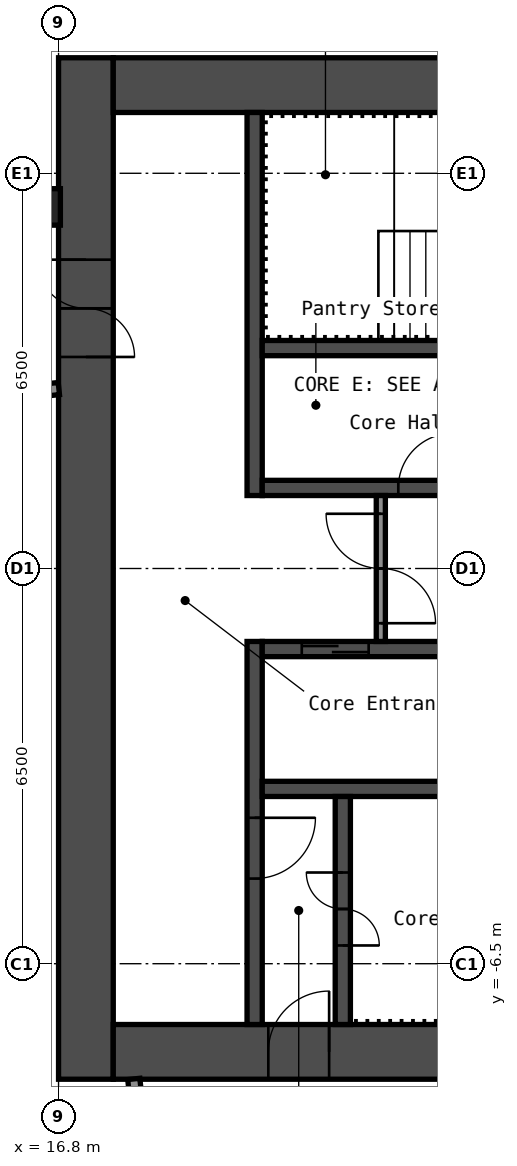
"""IFC4 building model, lengths in metres.
Left out: names, types, materials, properties, quantities, classifications, styles, units other than length and angle.
Written with IfcOpenShell. Run it as: python <this file> out.ifc"""

import sys

from ifc_helpers import new_model, si_unit, direction, frame, frame_2d, origin, origin_2d, place, context, subcontext, project, spatial, rectangle, hollow_rectangle, extrude, element, fill, save


model = new_model("IFC4")
c1 = context("Model", 3, precision=1e-05, world=origin(), true_north=direction((0.0, 1.0)))
c2 = subcontext(c1, "Body", "Model", "MODEL_VIEW")
j1 = project(units=[si_unit("LENGTHUNIT", "METRE"), si_unit("PLANEANGLEUNIT", "RADIAN")], contexts=[c1])
p1 = place(None, origin())
s1 = spatial("IfcSite", under=j1, at=p1, CompositionType="ELEMENT")
p2 = place(p1, origin())
s2 = spatial("IfcBuilding", under=s1, at=p2, CompositionType="ELEMENT")
p3 = place(p2, frame((0.0, 0.0, 258.2)))
s3 = spatial("IfcBuildingStorey", under=s2, at=p3, CompositionType="ELEMENT", Elevation=258.2)
p4 = place(p3, frame((16.53, 5.947, 0.0), z_axis=(0.0, 0.0, 1.0), x_axis=(1.0, 0.0, 0.0)))
e1 = element("IfcColumn", 1, at=p4, inside=s3, PredefinedType="COLUMN", context=c2, shape_type="SweptSolid", body=[
    extrude(hollow_rectangle(XDim=0.6, YDim=0.6, WallThickness=0.025, InnerFilletRadius=0.038, OuterFilletRadius=0.062, at=origin_2d()), origin(), (0.0, 0.0, 1.0), 2.75),
])
p5 = place(p3, frame((17.25, -8.4, 0.0), z_axis=(0.0, 0.0, 1.0), x_axis=(0.0, 1.0, 0.0)))
e2 = element("IfcWall", 2, at=p5, inside=s3, PredefinedType="SHEAR", context=c2, shape_type="SweptSolid", body=[
    extrude(rectangle(XDim=16.8, YDim=0.9, at=frame_2d((8.4, 0.0))), origin(), (0.0, 0.0, 1.0), 2.75),
])
p6 = place(p5, frame((11.879, 0.0, 0.0)))
e3 = element("IfcOpeningElement", 3, at=p6, cuts=e2, PredefinedType="OPENING", context=c2, shape_type="SweptSolid", body=[
    extrude(rectangle(XDim=1.6, YDim=2.1, at=frame_2d((0.8, 1.05))), frame((0.0, 0.46, 0.0), z_axis=(0.0, -1.0, 0.0), x_axis=(1.0, 0.0, 0.0)), (0.0, 0.0, 1.0), 0.92),
])
p7 = place(p3, frame((17.7, 7.95, 0.0), z_axis=(0.0, 0.0, 1.0), x_axis=(1.0, 0.0, 0.0)))
e4 = element("IfcWall", 4, at=p7, inside=s3, PredefinedType="SHEAR", context=c2, shape_type="SweptSolid", body=[
    extrude(rectangle(XDim=15.0, YDim=0.9, at=frame_2d((7.5, 0.0))), origin(), (0.0, 0.0, 1.0), 2.75),
])
p8 = place(p7, frame((10.4, 0.0, 0.0)))
e5 = element("IfcOpeningElement", 5, at=p8, cuts=e4, PredefinedType="OPENING", context=c2, shape_type="SweptSolid", body=[
    extrude(rectangle(XDim=1.2, YDim=2.1, at=frame_2d((0.6, 1.05))), frame((0.0, 0.46, 0.0), z_axis=(0.0, -1.0, 0.0), x_axis=(1.0, 0.0, 0.0)), (0.0, 0.0, 1.0), 0.92),
])
p9 = place(p7, frame((13.35, 0.0, 0.0)))
e6 = element("IfcOpeningElement", 6, at=p9, cuts=e4, PredefinedType="OPENING", context=c2, shape_type="SweptSolid", body=[
    extrude(rectangle(XDim=0.9, YDim=2.1, at=frame_2d((0.45, 1.05))), frame((0.0, 0.46, 0.0), z_axis=(0.0, -1.0, 0.0), x_axis=(1.0, 0.0, 0.0)), (0.0, 0.0, 1.0), 0.92),
])
p10 = place(p3, frame((17.7, -7.95, 0.0), z_axis=(0.0, 0.0, 1.0), x_axis=(1.0, 0.0, 0.0)))
e7 = element("IfcWall", 7, at=p10, inside=s3, PredefinedType="SHEAR", context=c2, shape_type="SweptSolid", body=[
    extrude(rectangle(XDim=15.0, YDim=0.9, at=frame_2d((7.5, 0.0))), origin(), (0.0, 0.0, 1.0), 2.75),
])
p11 = place(p10, frame((2.55, 0.0, 0.0)))
e8 = element("IfcOpeningElement", 8, at=p11, cuts=e7, PredefinedType="OPENING", context=c2, shape_type="SweptSolid", body=[
    extrude(rectangle(XDim=1.0, YDim=2.1, at=frame_2d((0.5, 1.05))), frame((0.0, 0.46, 0.0), z_axis=(0.0, -1.0, 0.0), x_axis=(1.0, 0.0, 0.0)), (0.0, 0.0, 1.0), 0.92),
])
p12 = place(p3, frame((20.025, 1.2, 0.0), z_axis=(0.0, 0.0, 1.0), x_axis=(0.0, 1.0, 0.0)))
e9 = element("IfcWall", 9, at=p12, inside=s3, PredefinedType="SHEAR", context=c2, shape_type="SweptSolid", body=[
    extrude(rectangle(XDim=6.3, YDim=0.25, at=frame_2d((3.15, 0.0))), origin(), (0.0, 0.0, 1.0), 2.75),
])
p13 = place(p3, frame((20.025, -7.5, 0.0), z_axis=(0.0, 0.0, 1.0), x_axis=(0.0, 1.0, 0.0)))
e10 = element("IfcWall", 10, at=p13, inside=s3, PredefinedType="SHEAR", context=c2, shape_type="SweptSolid", body=[
    extrude(rectangle(XDim=6.3, YDim=0.25, at=frame_2d((3.15, 0.0))), origin(), (0.0, 0.0, 1.0), 2.75),
])
p14 = place(p13, frame((2.4, 0.0, 0.0)))
e11 = element("IfcOpeningElement", 11, at=p14, cuts=e10, PredefinedType="OPENING", context=c2, shape_type="SweptSolid", body=[
    extrude(rectangle(XDim=1.0, YDim=2.1, at=frame_2d((0.5, 1.05))), frame((0.0, 0.135, 0.0), z_axis=(0.0, -1.0, 0.0), x_axis=(1.0, 0.0, 0.0)), (0.0, 0.0, 1.0), 0.27),
])
p15 = place(p3, frame((20.15, 1.325, 0.0), z_axis=(0.0, 0.0, 1.0), x_axis=(1.0, 0.0, 0.0)))
e12 = element("IfcWall", 12, at=p15, inside=s3, PredefinedType="SHEAR", context=c2, shape_type="SweptSolid", body=[
    extrude(rectangle(XDim=7.5, YDim=0.25, at=frame_2d((3.75, 0.0))), origin(), (0.0, 0.0, 1.0), 2.75),
])
p16 = place(p15, frame((2.238, 0.0, 0.0)))
e13 = element("IfcOpeningElement", 13, at=p16, cuts=e12, PredefinedType="OPENING", context=c2, shape_type="SweptSolid", body=[
    extrude(rectangle(XDim=0.9, YDim=2.1, at=frame_2d((0.45, 1.05))), frame((0.0, 0.135, 0.0), z_axis=(0.0, -1.0, 0.0), x_axis=(1.0, 0.0, 0.0)), (0.0, 0.0, 1.0), 0.27),
])
p17 = place(p15, frame((5.938, 0.0, 0.0)))
e14 = element("IfcOpeningElement", 14, at=p17, cuts=e12, PredefinedType="OPENING", context=c2, shape_type="SweptSolid", body=[
    extrude(rectangle(XDim=0.9, YDim=2.1, at=frame_2d((0.45, 1.05))), frame((0.0, 0.135, 0.0), z_axis=(0.0, -1.0, 0.0), x_axis=(1.0, 0.0, 0.0)), (0.0, 0.0, 1.0), 0.27),
])
p18 = place(p3, frame((20.15, 3.625, 0.0), z_axis=(0.0, 0.0, 1.0), x_axis=(1.0, 0.0, 0.0)))
e15 = element("IfcWall", 15, at=p18, inside=s3, PredefinedType="SHEAR", context=c2, shape_type="SweptSolid", body=[
    extrude(rectangle(XDim=7.5, YDim=0.25, at=frame_2d((3.75, 0.0))), origin(), (0.0, 0.0, 1.0), 2.75),
])
p19 = place(p3, frame((20.15, -1.325, 0.0), z_axis=(0.0, 0.0, 1.0), x_axis=(1.0, 0.0, 0.0)))
e16 = element("IfcWall", 16, at=p19, inside=s3, PredefinedType="SHEAR", context=c2, shape_type="SweptSolid", body=[
    extrude(rectangle(XDim=7.5, YDim=0.25, at=frame_2d((3.75, 0.0))), origin(), (0.0, 0.0, 1.0), 2.75),
])
p20 = place(p19, frame((0.65, 0.0, 0.0)))
e17 = element("IfcOpeningElement", 17, at=p20, cuts=e16, PredefinedType="OPENING", context=c2, shape_type="SweptSolid", body=[
    extrude(rectangle(XDim=1.1, YDim=2.1, at=frame_2d((0.55, 1.05))), frame((0.0, 0.135, 0.0), z_axis=(0.0, -1.0, 0.0), x_axis=(1.0, 0.0, 0.0)), (0.0, 0.0, 1.0), 0.27),
])
p21 = place(p19, frame((3.05, 0.0, 0.0)))
e18 = element("IfcOpeningElement", 18, at=p21, cuts=e16, PredefinedType="OPENING", context=c2, shape_type="SweptSolid", body=[
    extrude(rectangle(XDim=1.1, YDim=2.1, at=frame_2d((0.55, 1.05))), frame((0.0, 0.135, 0.0), z_axis=(0.0, -1.0, 0.0), x_axis=(1.0, 0.0, 0.0)), (0.0, 0.0, 1.0), 0.27),
])
p22 = place(p19, frame((5.45, 0.0, 0.0)))
e19 = element("IfcOpeningElement", 19, at=p22, cuts=e16, PredefinedType="OPENING", context=c2, shape_type="SweptSolid", body=[
    extrude(rectangle(XDim=1.1, YDim=2.1, at=frame_2d((0.55, 1.05))), frame((0.0, 0.135, 0.0), z_axis=(0.0, -1.0, 0.0), x_axis=(1.0, 0.0, 0.0)), (0.0, 0.0, 1.0), 0.27),
])
p23 = place(p3, frame((20.15, -3.625, 0.0), z_axis=(0.0, 0.0, 1.0), x_axis=(1.0, 0.0, 0.0)))
e20 = element("IfcWall", 20, at=p23, inside=s3, PredefinedType="SHEAR", context=c2, shape_type="SweptSolid", body=[
    extrude(rectangle(XDim=7.5, YDim=0.25, at=frame_2d((3.75, 0.0))), origin(), (0.0, 0.0, 1.0), 2.75),
])
p24 = place(p3, frame((21.475, -7.5, 0.0), z_axis=(0.0, 0.0, 1.0), x_axis=(0.0, 1.0, 0.0)))
e21 = element("IfcWall", 21, at=p24, inside=s3, PredefinedType="SHEAR", context=c2, shape_type="SweptSolid", body=[
    extrude(rectangle(XDim=3.75, YDim=0.25, at=frame_2d((1.875, 0.0))), origin(), (0.0, 0.0, 1.0), 2.75),
])
p25 = place(p24, frame((1.3, 0.0, 0.0)))
e22 = element("IfcOpeningElement", 22, at=p25, cuts=e21, PredefinedType="OPENING", context=c2, shape_type="SweptSolid", body=[
    extrude(rectangle(XDim=1.2, YDim=2.1, at=frame_2d((0.6, 1.05))), frame((0.0, 0.135, 0.0), z_axis=(0.0, -1.0, 0.0), x_axis=(1.0, 0.0, 0.0)), (0.0, 0.0, 1.0), 0.27),
])
p26 = place(p3, frame((22.1, -1.2, 0.0), z_axis=(0.0, 0.0, 1.0), x_axis=(0.0, 1.0, 0.0)))
e23 = element("IfcWall", 23, at=p26, inside=s3, PredefinedType="PARTITIONING", context=c2, shape_type="SweptSolid", body=[
    extrude(rectangle(XDim=2.4, YDim=0.15, at=frame_2d((1.2, 0.0))), origin(), (0.0, 0.0, 1.0), 2.75),
])
p27 = place(p26, frame((0.3, 0.0, 0.0)))
e24 = element("IfcOpeningElement", 24, at=p27, cuts=e23, PredefinedType="OPENING", context=c2, shape_type="SweptSolid", body=[
    extrude(rectangle(XDim=1.8, YDim=2.1, at=frame_2d((0.9, 1.05))), frame((0.0, 0.085, 0.0), z_axis=(0.0, -1.0, 0.0), x_axis=(1.0, 0.0, 0.0)), (0.0, 0.0, 1.0), 0.17),
])
p28 = place(p3, frame((-16.572, -0.549, 0.0), z_axis=(0.0, 0.0, 1.0), x_axis=(0.994521146831, 0.104535584879, 0.0)))
e25 = element("IfcWall", 25, at=p28, inside=s3, PredefinedType="PARTITIONING", context=c2, shape_type="SweptSolid", body=[
    extrude(rectangle(XDim=33.561, YDim=0.2, at=frame_2d((16.78, 0.0))), origin(), (0.0, 0.0, 1.0), 2.75),
])
p29 = place(p28, frame((1.82, 0.0, 0.0)))
e26 = element("IfcOpeningElement", 26, at=p29, cuts=e25, PredefinedType="OPENING", context=c2, shape_type="SweptSolid", body=[
    extrude(rectangle(XDim=0.9, YDim=2.1, at=frame_2d((0.45, 1.05))), frame((0.0, 0.11, 0.0), z_axis=(0.0, -1.0, 0.0), x_axis=(1.0, 0.0, 0.0)), (0.0, 0.0, 1.0), 0.22),
])
p30 = place(p28, frame((6.02, 0.0, 0.0)))
e27 = element("IfcOpeningElement", 27, at=p30, cuts=e25, PredefinedType="OPENING", context=c2, shape_type="SweptSolid", body=[
    extrude(rectangle(XDim=0.9, YDim=2.1, at=frame_2d((0.45, 1.05))), frame((0.0, 0.11, 0.0), z_axis=(0.0, -1.0, 0.0), x_axis=(1.0, 0.0, 0.0)), (0.0, 0.0, 1.0), 0.22),
])
p31 = place(p28, frame((11.25, 0.0, 0.0)))
e28 = element("IfcOpeningElement", 28, at=p31, cuts=e25, PredefinedType="OPENING", context=c2, shape_type="SweptSolid", body=[
    extrude(rectangle(XDim=1.0, YDim=2.1, at=frame_2d((0.5, 1.05))), frame((0.0, 0.11, 0.0), z_axis=(0.0, -1.0, 0.0), x_axis=(1.0, 0.0, 0.0)), (0.0, 0.0, 1.0), 0.22),
])
p32 = place(p28, frame((12.95, 0.0, 0.0)))
e29 = element("IfcOpeningElement", 29, at=p32, cuts=e25, PredefinedType="OPENING", context=c2, shape_type="SweptSolid", body=[
    extrude(rectangle(XDim=1.0, YDim=2.1, at=frame_2d((0.5, 1.05))), frame((0.0, 0.11, 0.0), z_axis=(0.0, -1.0, 0.0), x_axis=(1.0, 0.0, 0.0)), (0.0, 0.0, 1.0), 0.22),
])
p33 = place(p28, frame((17.86, 0.0, 0.0)))
e30 = element("IfcOpeningElement", 30, at=p33, cuts=e25, PredefinedType="OPENING", context=c2, shape_type="SweptSolid", body=[
    extrude(rectangle(XDim=0.9, YDim=2.1, at=frame_2d((0.45, 1.05))), frame((0.0, 0.11, 0.0), z_axis=(0.0, -1.0, 0.0), x_axis=(1.0, 0.0, 0.0)), (0.0, 0.0, 1.0), 0.22),
])
p34 = place(p28, frame((22.06, 0.0, 0.0)))
e31 = element("IfcOpeningElement", 31, at=p34, cuts=e25, PredefinedType="OPENING", context=c2, shape_type="SweptSolid", body=[
    extrude(rectangle(XDim=0.9, YDim=2.1, at=frame_2d((0.45, 1.05))), frame((0.0, 0.11, 0.0), z_axis=(0.0, -1.0, 0.0), x_axis=(1.0, 0.0, 0.0)), (0.0, 0.0, 1.0), 0.22),
])
p35 = place(p28, frame((29.4, 0.0, 0.0)))
e32 = element("IfcOpeningElement", 32, at=p35, cuts=e25, PredefinedType="OPENING", context=c2, shape_type="SweptSolid", body=[
    extrude(rectangle(XDim=1.6, YDim=2.1, at=frame_2d((0.8, 1.05))), frame((0.0, 0.11, 0.0), z_axis=(0.0, -1.0, 0.0), x_axis=(1.0, 0.0, 0.0)), (0.0, 0.0, 1.0), 0.22),
])
p36 = place(p3, frame((18.516, -12.949, 0.0), z_axis=(0.0, 0.0, 1.0), x_axis=(-0.104548796268, 0.994519758074, 0.0)))
e33 = element("IfcWall", 33, at=p36, inside=s3, PredefinedType="PARTITIONING", context=c2, shape_type="SweptSolid", body=[
    extrude(rectangle(XDim=4.579, YDim=0.2, at=frame_2d((2.29, 0.0))), origin(), (0.0, 0.0, 1.0), 2.75),
])
p37 = place(p6, origin())
e34 = element("IfcDoor", 34, at=p37, inside=s3, OperationType="DOUBLE_DOOR_SINGLE_SWING", PredefinedType="DOOR", context=c2, shape_type="SweptSolid", body=[
    extrude(rectangle(XDim=1.6, YDim=2.1, at=frame_2d((0.8, 1.05))), frame((0.0, 0.025, 0.0), z_axis=(0.0, -1.0, 0.0), x_axis=(1.0, 0.0, 0.0)), (0.0, 0.0, 1.0), 0.05),
])
fill(e3, e34)
p38 = place(p11, origin())
e35 = element("IfcDoor", 35, at=p38, inside=s3, OperationType="SINGLE_SWING_LEFT", PredefinedType="DOOR", context=c2, shape_type="SweptSolid", body=[
    extrude(rectangle(XDim=1.0, YDim=2.1, at=frame_2d((0.5, 1.05))), frame((0.0, 0.025, 0.0), z_axis=(0.0, -1.0, 0.0), x_axis=(1.0, 0.0, 0.0)), (0.0, 0.0, 1.0), 0.05),
])
fill(e8, e35)
p39 = place(p25, origin())
e36 = element("IfcDoor", 36, at=p39, inside=s3, OperationType="DOUBLE_DOOR_SINGLE_SWING", PredefinedType="DOOR", context=c2, shape_type="SweptSolid", body=[
    extrude(rectangle(XDim=1.2, YDim=2.1, at=frame_2d((0.6, 1.05))), frame((0.0, 0.025, 0.0), z_axis=(0.0, -1.0, 0.0), x_axis=(1.0, 0.0, 0.0)), (0.0, 0.0, 1.0), 0.05),
])
fill(e22, e36)
p40 = place(p14, origin())
e37 = element("IfcDoor", 37, at=p40, inside=s3, OperationType="SINGLE_SWING_RIGHT", PredefinedType="DOOR", context=c2, shape_type="SweptSolid", body=[
    extrude(rectangle(XDim=1.0, YDim=2.1, at=frame_2d((0.5, 1.05))), frame((0.0, 0.025, 0.0), z_axis=(0.0, -1.0, 0.0), x_axis=(1.0, 0.0, 0.0)), (0.0, 0.0, 1.0), 0.05),
])
fill(e11, e37)
p41 = place(p27, origin())
e38 = element("IfcDoor", 38, at=p41, inside=s3, OperationType="DOUBLE_DOOR_SINGLE_SWING", PredefinedType="DOOR", context=c2, shape_type="SweptSolid", body=[
    extrude(rectangle(XDim=1.8, YDim=2.1, at=frame_2d((0.9, 1.05))), frame((0.0, 0.025, 0.0), z_axis=(0.0, -1.0, 0.0), x_axis=(1.0, 0.0, 0.0)), (0.0, 0.0, 1.0), 0.05),
])
fill(e24, e38)
p42 = place(p16, origin())
e39 = element("IfcDoor", 39, at=p42, inside=s3, OperationType="SINGLE_SWING_LEFT", PredefinedType="DOOR", context=c2, shape_type="SweptSolid", body=[
    extrude(rectangle(XDim=0.9, YDim=2.1, at=frame_2d((0.45, 1.05))), frame((0.0, 0.025, 0.0), z_axis=(0.0, -1.0, 0.0), x_axis=(1.0, 0.0, 0.0)), (0.0, 0.0, 1.0), 0.05),
])
fill(e13, e39)
p43 = place(p20, origin())
e40 = element("IfcDoor", 40, at=p43, inside=s3, OperationType="DOUBLE_DOOR_SLIDING", PredefinedType="DOOR", context=c2, shape_type="SweptSolid", body=[
    extrude(rectangle(XDim=1.1, YDim=2.1, at=frame_2d((0.55, 1.05))), frame((0.0, 0.025, 0.0), z_axis=(0.0, -1.0, 0.0), x_axis=(1.0, 0.0, 0.0)), (0.0, 0.0, 1.0), 0.05),
])
fill(e17, e40)
save(model, sys.argv[1])
